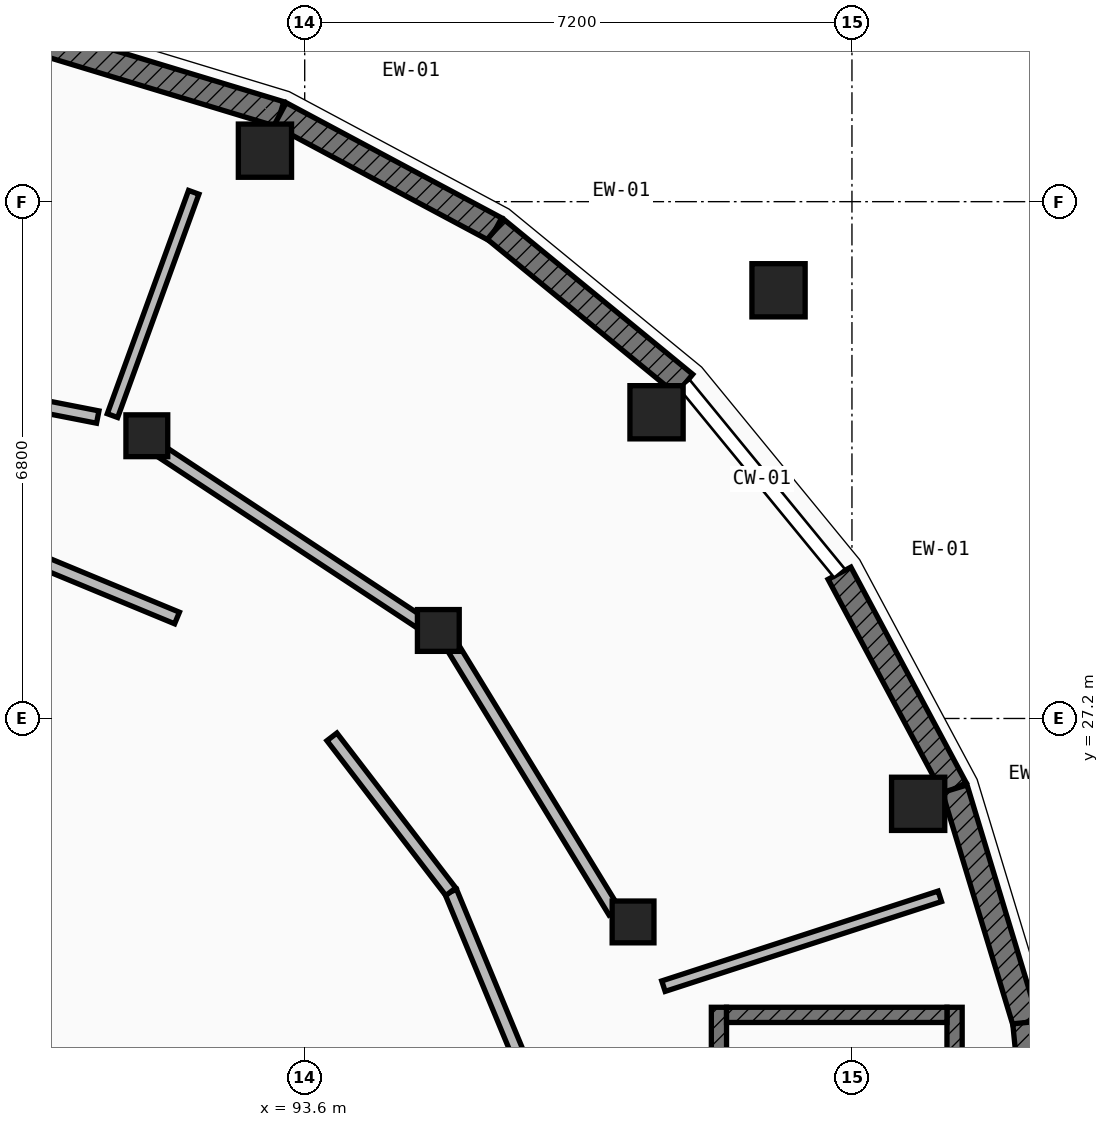
"""IFC4 building model, lengths in metres.
Left out: names, types, materials, properties, quantities, classifications, styles, units other than length and angle.
Written with IfcOpenShell. Run it as: python <this file> out.ifc"""

import sys

from ifc_helpers import new_model, si_unit, direction, frame, frame_2d, origin, origin_2d, place, context, subcontext, project, spatial, rectangle, circle, extrude, element, fill, save


model = new_model("IFC4")
c1 = context("Model", 3, precision=1e-05, world=origin(), true_north=direction((0.0, 1.0)))
c2 = subcontext(c1, "Body", "Model", "MODEL_VIEW")
j1 = project(units=[si_unit("LENGTHUNIT", "METRE"), si_unit("PLANEANGLEUNIT", "RADIAN")], contexts=[c1])
p1 = place(None, origin())
s1 = spatial("IfcSite", under=j1, at=p1, CompositionType="ELEMENT")
p2 = place(p1, origin())
s2 = spatial("IfcBuilding", under=s1, at=p2, CompositionType="ELEMENT")
p3 = place(p2, origin())
s3 = spatial("IfcBuildingStorey", under=s2, at=p3, CompositionType="ELEMENT", Elevation=0.0)
for number, where, z_axis, x_axis in (
    (1, (101.671, 26.077, 0.0), (0.0, 0.0, 1.0), (1.0, 0.0, 0.0)),
    (2, (98.229, 31.229, 0.0), (0.0, 0.0, 1.0), (1.0, 0.0, 0.0)),
    (3, (93.077, 34.671, 0.0), (0.0, 0.0, 1.0), (1.0, 0.0, 0.0)),
):
    element("IfcColumn", number, at=place(p3, frame(where, z_axis=z_axis, x_axis=x_axis)), inside=s3, PredefinedType="COLUMN", context=c2, shape_type="SweptSolid", body=[
        extrude(circle(Radius=0.35, at=origin_2d()), origin(), (0.0, 0.0, 1.0), 4.55),
    ])
for number, where, z_axis, x_axis in (
    (4, (97.92, 24.523, 0.0), (0.0, 0.0, 1.0), (1.0, 0.0, 0.0)),
    (5, (95.358, 28.358, 0.0), (0.0, 0.0, 1.0), (1.0, 0.0, 0.0)),
    (6, (91.523, 30.92, 0.0), (0.0, 0.0, 1.0), (1.0, 0.0, 0.0)),
):
    element("IfcColumn", number, at=place(p3, frame(where, z_axis=z_axis, x_axis=x_axis)), inside=s3, PredefinedType="COLUMN", context=c2, shape_type="SweptSolid", body=[
        extrude(rectangle(XDim=0.55, YDim=0.55, at=origin_2d()), origin(), (0.0, 0.0, 1.0), 4.55),
    ])
p4 = place(p3, frame((99.834, 32.834, 0.0), z_axis=(0.0, 0.0, 1.0), x_axis=(1.0, 0.0, 0.0)))
e7 = element("IfcColumn", 7, at=p4, inside=s3, PredefinedType="COLUMN", context=c2, shape_type="SweptSolid", body=[
    extrude(circle(Radius=0.35, at=origin_2d()), origin(), (0.0, 0.0, 1.0), 4.55),
])
p5 = place(p3, frame((90.199, 36.085, 0.0), z_axis=(0.0, 0.0, 1.0), x_axis=(0.956984161567, -0.29014016356, 0.0)))
e8 = element("IfcWall", 8, at=p5, inside=s3, PredefinedType="SOLIDWALL", context=c2, shape_type="SweptSolid", body=[
    extrude(rectangle(XDim=3.215, YDim=0.34, at=frame_2d((1.607, 0.0))), origin(), (0.0, 0.0, 1.0), 3.659),
])
p6 = place(p5, frame((0.783, 0.0, 0.0)))
e9 = element("IfcOpeningElement", 9, at=p6, cuts=e8, PredefinedType="OPENING", context=c2, shape_type="SweptSolid", body=[
    extrude(rectangle(XDim=1.65, YDim=2.45, at=frame_2d((0.825, 1.225))), frame((0.0, 0.18, 0.0), z_axis=(0.0, -1.0, 0.0), x_axis=(1.0, 0.0, 0.0)), (0.0, 0.0, 1.0), 0.36),
])
for number, where, z_axis, x_axis in (
    (10, (93.276, 35.152, 0.0), (0.0, 0.0, 1.0), (0.882, -0.472, 0.0)),
    (11, (96.111, 33.636, 0.0), (0.0, 0.0, 1.0), (0.773, -0.634, 0.0)),
):
    element("IfcWall", number, at=place(p3, frame(where, z_axis=z_axis, x_axis=x_axis)), inside=s3, PredefinedType="SOLIDWALL", context=c2, shape_type="SweptSolid", body=[
        extrude(rectangle(XDim=3.215, YDim=0.34, at=frame_2d((1.607, 0.0))), origin(), (0.0, 0.0, 1.0), 3.659),
    ])
p7 = place(p3, frame((100.636, 29.111, 0.0), z_axis=(0.0, 0.0, 1.0), x_axis=(0.47155750426, -0.881835313523, 0.0)))
e12 = element("IfcWall", 12, at=p7, inside=s3, PredefinedType="SOLIDWALL", context=c2, shape_type="SweptSolid", body=[
    extrude(rectangle(XDim=3.215, YDim=0.34, at=frame_2d((1.607, 0.0))), origin(), (0.0, 0.0, 1.0), 3.659),
])
p8 = place(p7, frame((0.707, 0.0, 0.0)))
e13 = element("IfcOpeningElement", 13, at=p8, cuts=e12, PredefinedType="OPENING", context=c2, shape_type="SweptSolid", body=[
    extrude(rectangle(XDim=1.8, YDim=2.55, at=frame_2d((0.9, 1.275))), frame((0.0, 0.18, 0.0), z_axis=(0.0, -1.0, 0.0), x_axis=(1.0, 0.0, 0.0)), (0.0, 0.0, 1.0), 0.36),
])
p9 = place(p3, frame((102.152, 26.276, 0.0), z_axis=(0.0, 0.0, 1.0), x_axis=(0.29014016356, -0.956984161567, 0.0)))
e14 = element("IfcWall", 14, at=p9, inside=s3, PredefinedType="SOLIDWALL", context=c2, shape_type="SweptSolid", body=[
    extrude(rectangle(XDim=3.215, YDim=0.34, at=frame_2d((1.607, 0.0))), origin(), (0.0, 0.0, 1.0), 3.659),
])
p10 = place(p3, frame((103.085, 23.199, 0.0), z_axis=(0.0, 0.0, 1.0), x_axis=(0.097977057849, -0.995188673637, 0.0)))
e15 = element("IfcWall", 15, at=p10, inside=s3, PredefinedType="SOLIDWALL", context=c2, shape_type="SweptSolid", body=[
    extrude(rectangle(XDim=3.214, YDim=0.34, at=frame_2d((1.607, 0.0))), origin(), (0.0, 0.0, 1.0), 3.659),
])
p11 = place(p3, frame((99.05, 23.4, 0.0), z_axis=(0.0, 0.0, 1.0), x_axis=(0.0, -1.0, 0.0)))
e16 = element("IfcWall", 16, at=p11, inside=s3, PredefinedType="SHEAR", context=c2, shape_type="SweptSolid", body=[
    extrude(rectangle(XDim=6.8, YDim=0.2, at=frame_2d((3.4, 0.0))), origin(), (0.0, 0.0, 1.0), 4.305),
])
p12 = place(p11, frame((0.38, 0.0, 0.0)))
e17 = element("IfcOpeningElement", 17, at=p12, cuts=e16, PredefinedType="OPENING", context=c2, shape_type="SweptSolid", body=[
    extrude(rectangle(XDim=1.05, YDim=2.15, at=frame_2d((0.525, 1.075))), frame((0.0, 0.11, 0.0), z_axis=(0.0, -1.0, 0.0), x_axis=(1.0, 0.0, 0.0)), (0.0, 0.0, 1.0), 0.22),
])
p13 = place(p3, frame((102.15, 23.4, 0.0), z_axis=(0.0, 0.0, 1.0), x_axis=(0.0, -1.0, 0.0)))
e18 = element("IfcWall", 18, at=p13, inside=s3, PredefinedType="SHEAR", context=c2, shape_type="SweptSolid", body=[
    extrude(rectangle(XDim=6.8, YDim=0.2, at=frame_2d((3.4, 0.0))), origin(), (0.0, 0.0, 1.0), 4.305),
])
p14 = place(p3, frame((99.15, 23.3, 0.0), z_axis=(0.0, 0.0, 1.0), x_axis=(1.0, 0.0, 0.0)))
e19 = element("IfcWall", 19, at=p14, inside=s3, PredefinedType="SHEAR", context=c2, shape_type="SweptSolid", body=[
    extrude(rectangle(XDim=2.9, YDim=0.2, at=frame_2d((1.45, 0.0))), origin(), (0.0, 0.0, 1.0), 4.305),
])
p15 = place(p3, frame((96.505, 22.547, 0.0), z_axis=(0.0, 0.0, 1.0), x_axis=(-0.382704397106, 0.923870848353, 0.0)))
e20 = element("IfcWall", 20, at=p15, inside=s3, PredefinedType="PARTITIONING", context=c2, shape_type="SweptSolid", body=[
    extrude(rectangle(XDim=2.568, YDim=0.165, at=frame_2d((1.284, 0.0))), origin(), (0.0, 0.0, 1.0), 3.634),
])
p16 = place(p15, frame((0.459, 0.0, 0.0)))
e21 = element("IfcOpeningElement", 21, at=p16, cuts=e20, PredefinedType="OPENING", context=c2, shape_type="SweptSolid", body=[
    extrude(rectangle(XDim=1.65, YDim=2.4, at=frame_2d((0.825, 1.2))), frame((0.0, 0.093, 0.0), z_axis=(0.0, -1.0, 0.0), x_axis=(1.0, 0.0, 0.0)), (0.0, 0.0, 1.0), 0.185),
])
p17 = place(p3, frame((95.522, 24.92, 0.0), z_axis=(0.0, 0.0, 1.0), x_axis=(-0.608782621434, 0.793337078322, 0.0)))
e22 = element("IfcWall", 22, at=p17, inside=s3, PredefinedType="PARTITIONING", context=c2, shape_type="SweptSolid", body=[
    extrude(rectangle(XDim=2.569, YDim=0.165, at=frame_2d((1.285, 0.0))), origin(), (0.0, 0.0, 1.0), 3.634),
])
p18 = place(p3, frame((91.92, 28.522, 0.0), z_axis=(0.0, 0.0, 1.0), x_axis=(-0.923870848353, 0.382704397106, 0.0)))
e23 = element("IfcWall", 23, at=p18, inside=s3, PredefinedType="PARTITIONING", context=c2, shape_type="SweptSolid", body=[
    extrude(rectangle(XDim=2.568, YDim=0.165, at=frame_2d((1.284, 0.0))), origin(), (0.0, 0.0, 1.0), 3.634),
])
p19 = place(p3, frame((98.32, 23.678, 0.0), z_axis=(0.0, 0.0, 1.0), x_axis=(0.951000745696, 0.309188585957, 0.0)))
e24 = element("IfcWall", 24, at=p19, inside=s3, PredefinedType="PARTITIONING", context=c2, shape_type="SweptSolid", body=[
    extrude(rectangle(XDim=3.823, YDim=0.145, at=frame_2d((1.912, 0.0))), origin(), (0.0, 0.0, 1.0), 3.634),
])
p20 = place(p3, frame((91.071, 31.185, 0.0), z_axis=(0.0, 0.0, 1.0), x_axis=(0.341881000608, 0.939743252928, 0.0)))
e25 = element("IfcWall", 25, at=p20, inside=s3, PredefinedType="PARTITIONING", context=c2, shape_type="SweptSolid", body=[
    extrude(rectangle(XDim=3.126, YDim=0.145, at=frame_2d((1.563, 0.0))), origin(), (0.0, 0.0, 1.0), 3.634),
])
p21 = place(p3, frame((97.674, 24.657, 0.0), z_axis=(0.0, 0.0, 1.0), x_axis=(-0.521326855472, 0.853357082213, 0.0)))
e26 = element("IfcWall", 26, at=p21, inside=s3, PredefinedType="PARTITIONING", context=c2, shape_type="SweptSolid", body=[
    extrude(rectangle(XDim=4.09, YDim=0.165, at=frame_2d((2.045, 0.0))), origin(), (0.0, 0.0, 1.0), 3.634),
])
p22 = place(p21, frame((1.545, 0.0, 0.0)))
e27 = element("IfcOpeningElement", 27, at=p22, cuts=e26, PredefinedType="OPENING", context=c2, shape_type="SweptSolid", body=[
    extrude(rectangle(XDim=1.0, YDim=2.14, at=frame_2d((0.5, 1.07))), frame((0.0, 0.093, 0.0), z_axis=(0.0, -1.0, 0.0), x_axis=(1.0, 0.0, 0.0)), (0.0, 0.0, 1.0), 0.185),
])
p23 = place(p3, frame((95.104, 28.474, 0.0), z_axis=(0.0, 0.0, 1.0), x_axis=(-0.834683396139, 0.55073008653, 0.0)))
e28 = element("IfcWall", 28, at=p23, inside=s3, PredefinedType="PARTITIONING", context=c2, shape_type="SweptSolid", body=[
    extrude(rectangle(XDim=4.065, YDim=0.165, at=frame_2d((2.033, 0.0))), origin(), (0.0, 0.0, 1.0), 3.634),
])
p24 = place(p3, frame((90.877, 31.166, 0.0), z_axis=(0.0, 0.0, 1.0), x_axis=(-0.981364628343, 0.192154797592, 0.0)))
e29 = element("IfcWall", 29, at=p24, inside=s3, PredefinedType="PARTITIONING", context=c2, shape_type="SweptSolid", body=[
    extrude(rectangle(XDim=3.32, YDim=0.165, at=frame_2d((1.66, 0.0))), origin(), (0.0, 0.0, 1.0), 3.634),
])
p25 = place(p24, frame((1.14, 0.0, 0.0)))
e30 = element("IfcOpeningElement", 30, at=p25, cuts=e29, PredefinedType="OPENING", context=c2, shape_type="SweptSolid", body=[
    extrude(rectangle(XDim=1.04, YDim=2.14, at=frame_2d((0.52, 1.07))), frame((0.0, 0.093, 0.0), z_axis=(0.0, -1.0, 0.0), x_axis=(1.0, 0.0, 0.0)), (0.0, 0.0, 1.0), 0.185),
])
p26 = place(p6, origin())
e31 = element("IfcDoor", 31, at=p26, inside=s3, OperationType="SINGLE_SWING_RIGHT", PredefinedType="DOOR", context=c2, shape_type="SweptSolid", body=[
    extrude(rectangle(XDim=1.65, YDim=2.45, at=frame_2d((0.825, 1.225))), frame((0.0, 0.025, 0.0), z_axis=(0.0, -1.0, 0.0), x_axis=(1.0, 0.0, 0.0)), (0.0, 0.0, 1.0), 0.05),
])
fill(e9, e31)
p27 = place(p8, origin())
e32 = element("IfcDoor", 32, at=p27, inside=s3, OperationType="SINGLE_SWING_LEFT", PredefinedType="DOOR", context=c2, shape_type="SweptSolid", body=[
    extrude(rectangle(XDim=1.8, YDim=2.55, at=frame_2d((0.9, 1.275))), frame((0.0, 0.025, 0.0), z_axis=(0.0, -1.0, 0.0), x_axis=(1.0, 0.0, 0.0)), (0.0, 0.0, 1.0), 0.05),
])
fill(e13, e32)
p28 = place(p12, origin())
e33 = element("IfcDoor", 33, at=p28, inside=s3, OperationType="SINGLE_SWING_LEFT", PredefinedType="DOOR", context=c2, shape_type="SweptSolid", body=[
    extrude(rectangle(XDim=1.05, YDim=2.15, at=frame_2d((0.525, 1.075))), frame((0.0, 0.025, 0.0), z_axis=(0.0, -1.0, 0.0), x_axis=(1.0, 0.0, 0.0)), (0.0, 0.0, 1.0), 0.05),
])
fill(e17, e33)
p29 = place(p16, origin())
e34 = element("IfcDoor", 34, at=p29, inside=s3, OperationType="SINGLE_SWING_RIGHT", PredefinedType="DOOR", context=c2, shape_type="SweptSolid", body=[
    extrude(rectangle(XDim=1.65, YDim=2.4, at=frame_2d((0.825, 1.2))), frame((0.0, 0.025, 0.0), z_axis=(0.0, -1.0, 0.0), x_axis=(1.0, 0.0, 0.0)), (0.0, 0.0, 1.0), 0.05),
])
fill(e21, e34)
p30 = place(p22, origin())
e35 = element("IfcDoor", 35, at=p30, inside=s3, OperationType="SINGLE_SWING_RIGHT", PredefinedType="DOOR", context=c2, shape_type="SweptSolid", body=[
    extrude(rectangle(XDim=1.0, YDim=2.14, at=frame_2d((0.5, 1.07))), frame((0.0, 0.025, 0.0), z_axis=(0.0, -1.0, 0.0), x_axis=(1.0, 0.0, 0.0)), (0.0, 0.0, 1.0), 0.05),
])
fill(e27, e35)
save(model, sys.argv[1])
